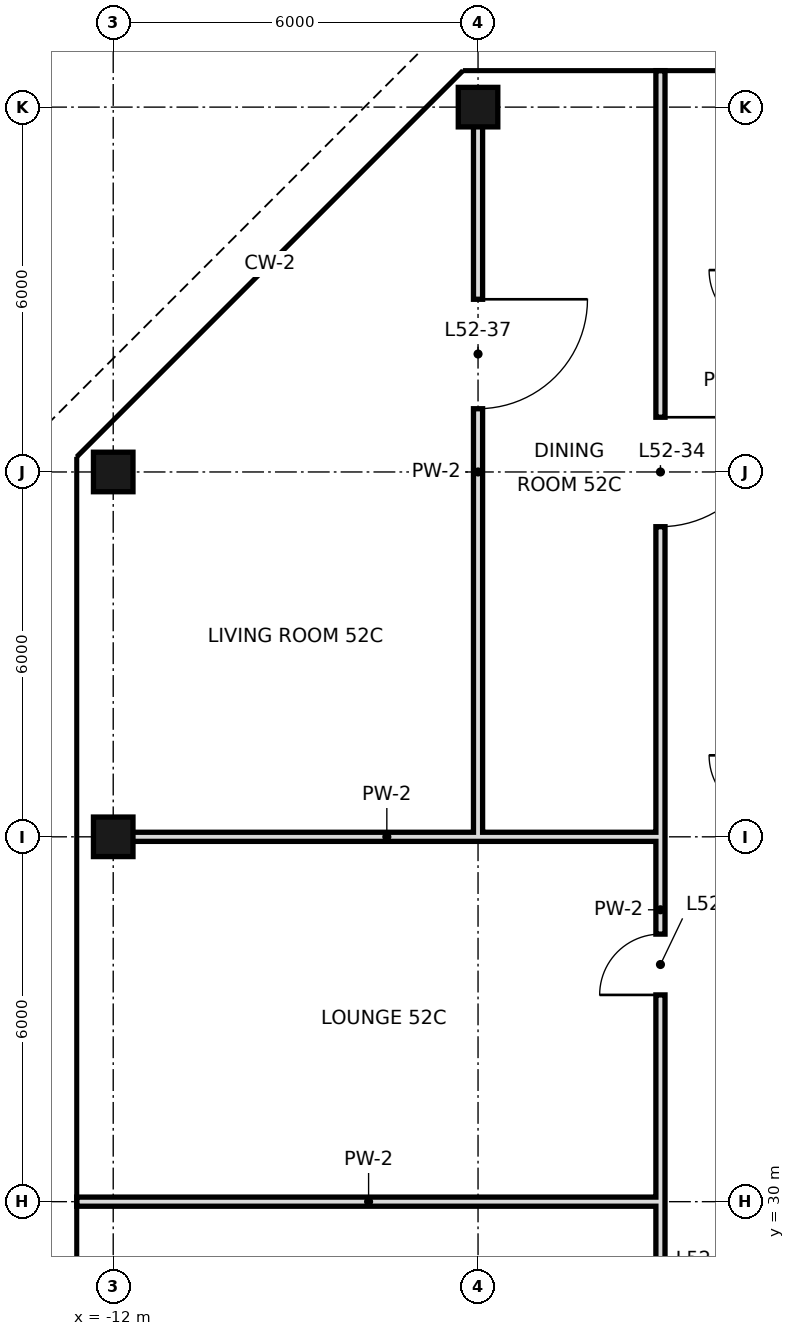
"""IFC4 building model, lengths in metres.
Left out: names, types, materials, properties, quantities, classifications, styles, units other than length and angle.
Written with IfcOpenShell. Run it as: python <this file> out.ifc"""

import sys

from ifc_helpers import new_model, si_unit, direction, frame, frame_2d, origin, origin_2d, place, context, subcontext, project, spatial, rectangle, hollow_rectangle, extrude, element, fill, save


model = new_model("IFC4")
c1 = context("Model", 3, precision=1e-05, world=origin(), true_north=direction((0.0, 1.0)))
c2 = subcontext(c1, "Body", "Model", "MODEL_VIEW")
j1 = project(units=[si_unit("LENGTHUNIT", "METRE"), si_unit("PLANEANGLEUNIT", "RADIAN")], contexts=[c1])
p1 = place(None, origin())
s1 = spatial("IfcSite", under=j1, at=p1, CompositionType="ELEMENT")
p2 = place(p1, origin())
s2 = spatial("IfcBuilding", under=s1, at=p2, CompositionType="ELEMENT")
p3 = place(p2, frame((0.0, 0.0, 222.6)))
s3 = spatial("IfcBuildingStorey", under=s2, at=p3, CompositionType="ELEMENT", Elevation=222.6)
for number, where, z_axis, x_axis in (
    (1, (-12.0, 36.0, 0.0), (0.0, 0.0, 1.0), (1.0, 0.0, 0.0)),
    (2, (-12.0, 42.0, 0.0), (0.0, 0.0, 1.0), (1.0, 0.0, 0.0)),
    (3, (-6.0, 48.0, 0.0), (0.0, 0.0, 1.0), (1.0, 0.0, 0.0)),
):
    element("IfcColumn", number, at=place(p3, frame(where, z_axis=z_axis, x_axis=x_axis)), inside=s3, PredefinedType="COLUMN", context=c2, shape_type="SweptSolid", body=[
        extrude(hollow_rectangle(XDim=0.65, YDim=0.65, WallThickness=0.032, at=origin_2d()), origin(), (0.0, 0.0, 1.0), 3.6),
    ])
p4 = place(p3, frame((-3.0, 21.0, 0.0), z_axis=(0.0, 0.0, 1.0), x_axis=(0.0, 1.0, 0.0)))
e4 = element("IfcWall", 4, at=p4, inside=s3, PredefinedType="PARTITIONING", context=c2, shape_type="SweptSolid", body=[
    extrude(rectangle(XDim=27.6, YDim=0.15, at=frame_2d((13.8, 0.0))), origin(), (0.0, 0.0, 1.0), 3.42),
])
p5 = place(p4, frame((1.3, 0.0, 0.0)))
e5 = element("IfcOpeningElement", 5, at=p5, cuts=e4, PredefinedType="OPENING", context=c2, shape_type="SweptSolid", body=[
    extrude(rectangle(XDim=1.0, YDim=2.4, at=frame_2d((0.5, 1.2))), frame((0.0, 0.085, 0.0), z_axis=(0.0, -1.0, 0.0), x_axis=(1.0, 0.0, 0.0)), (0.0, 0.0, 1.0), 0.17),
])
p6 = place(p4, frame((6.4, 0.0, 0.0)))
e6 = element("IfcOpeningElement", 6, at=p6, cuts=e4, PredefinedType="OPENING", context=c2, shape_type="SweptSolid", body=[
    extrude(rectangle(XDim=1.0, YDim=2.4, at=frame_2d((0.5, 1.2))), frame((0.0, 0.085, 0.0), z_axis=(0.0, -1.0, 0.0), x_axis=(1.0, 0.0, 0.0)), (0.0, 0.0, 1.0), 0.17),
])
p7 = place(p4, frame((12.4, 0.0, 0.0)))
e7 = element("IfcOpeningElement", 7, at=p7, cuts=e4, PredefinedType="OPENING", context=c2, shape_type="SweptSolid", body=[
    extrude(rectangle(XDim=1.0, YDim=2.4, at=frame_2d((0.5, 1.2))), frame((0.0, 0.085, 0.0), z_axis=(0.0, -1.0, 0.0), x_axis=(1.0, 0.0, 0.0)), (0.0, 0.0, 1.0), 0.17),
])
p8 = place(p4, frame((20.1, 0.0, 0.0)))
e8 = element("IfcOpeningElement", 8, at=p8, cuts=e4, PredefinedType="OPENING", context=c2, shape_type="SweptSolid", body=[
    extrude(rectangle(XDim=1.8, YDim=2.4, at=frame_2d((0.9, 1.2))), frame((0.0, 0.085, 0.0), z_axis=(0.0, -1.0, 0.0), x_axis=(1.0, 0.0, 0.0)), (0.0, 0.0, 1.0), 0.17),
])
p9 = place(p3, frame((-6.0, 36.0, 0.0), z_axis=(0.0, 0.0, 1.0), x_axis=(0.0, 1.0, 0.0)))
e9 = element("IfcWall", 9, at=p9, inside=s3, PredefinedType="PARTITIONING", context=c2, shape_type="SweptSolid", body=[
    extrude(rectangle(XDim=12.0, YDim=0.15, at=frame_2d((6.0, 0.0))), origin(), (0.0, 0.0, 1.0), 3.42),
])
p10 = place(p9, frame((7.04, 0.0, 0.0)))
e10 = element("IfcOpeningElement", 10, at=p10, cuts=e9, PredefinedType="OPENING", context=c2, shape_type="SweptSolid", body=[
    extrude(rectangle(XDim=1.8, YDim=2.4, at=frame_2d((0.9, 1.2))), frame((0.0, 0.085, 0.0), z_axis=(0.0, -1.0, 0.0), x_axis=(1.0, 0.0, 0.0)), (0.0, 0.0, 1.0), 0.17),
])
p11 = place(p3, frame((-12.6, 30.0, 0.0), z_axis=(0.0, 0.0, 1.0), x_axis=(1.0, 0.0, 0.0)))
e11 = element("IfcWall", 11, at=p11, inside=s3, PredefinedType="PARTITIONING", context=c2, shape_type="SweptSolid", body=[
    extrude(rectangle(XDim=9.6, YDim=0.15, at=frame_2d((4.8, 0.0))), origin(), (0.0, 0.0, 1.0), 2.72),
])
p12 = place(p3, frame((-12.0, 36.0, 0.0), z_axis=(0.0, 0.0, 1.0), x_axis=(1.0, 0.0, 0.0)))
e12 = element("IfcWall", 12, at=p12, inside=s3, PredefinedType="PARTITIONING", context=c2, shape_type="SweptSolid", body=[
    extrude(rectangle(XDim=9.0, YDim=0.15, at=frame_2d((4.5, 0.0))), origin(), (0.0, 0.0, 1.0), 2.72),
])
p13 = place(p7, origin())
e13 = element("IfcDoor", 13, at=p13, inside=s3, OperationType="SINGLE_SWING_LEFT", PredefinedType="DOOR", context=c2, shape_type="SweptSolid", body=[
    extrude(rectangle(XDim=1.0, YDim=2.4, at=frame_2d((0.5, 1.2))), frame((0.0, 0.025, 0.0), z_axis=(0.0, -1.0, 0.0), x_axis=(1.0, 0.0, 0.0)), (0.0, 0.0, 1.0), 0.05),
])
fill(e7, e13)
p14 = place(p8, origin())
e14 = element("IfcDoor", 14, at=p14, inside=s3, OperationType="SINGLE_SWING_RIGHT", PredefinedType="DOOR", context=c2, shape_type="SweptSolid", body=[
    extrude(rectangle(XDim=1.8, YDim=2.4, at=frame_2d((0.9, 1.2))), frame((0.0, 0.025, 0.0), z_axis=(0.0, -1.0, 0.0), x_axis=(1.0, 0.0, 0.0)), (0.0, 0.0, 1.0), 0.05),
])
fill(e8, e14)
p15 = place(p10, origin())
e15 = element("IfcDoor", 15, at=p15, inside=s3, OperationType="SINGLE_SWING_RIGHT", PredefinedType="DOOR", context=c2, shape_type="SweptSolid", body=[
    extrude(rectangle(XDim=1.8, YDim=2.4, at=frame_2d((0.9, 1.2))), frame((0.0, 0.025, 0.0), z_axis=(0.0, -1.0, 0.0), x_axis=(1.0, 0.0, 0.0)), (0.0, 0.0, 1.0), 0.05),
])
fill(e10, e15)
save(model, sys.argv[1])
